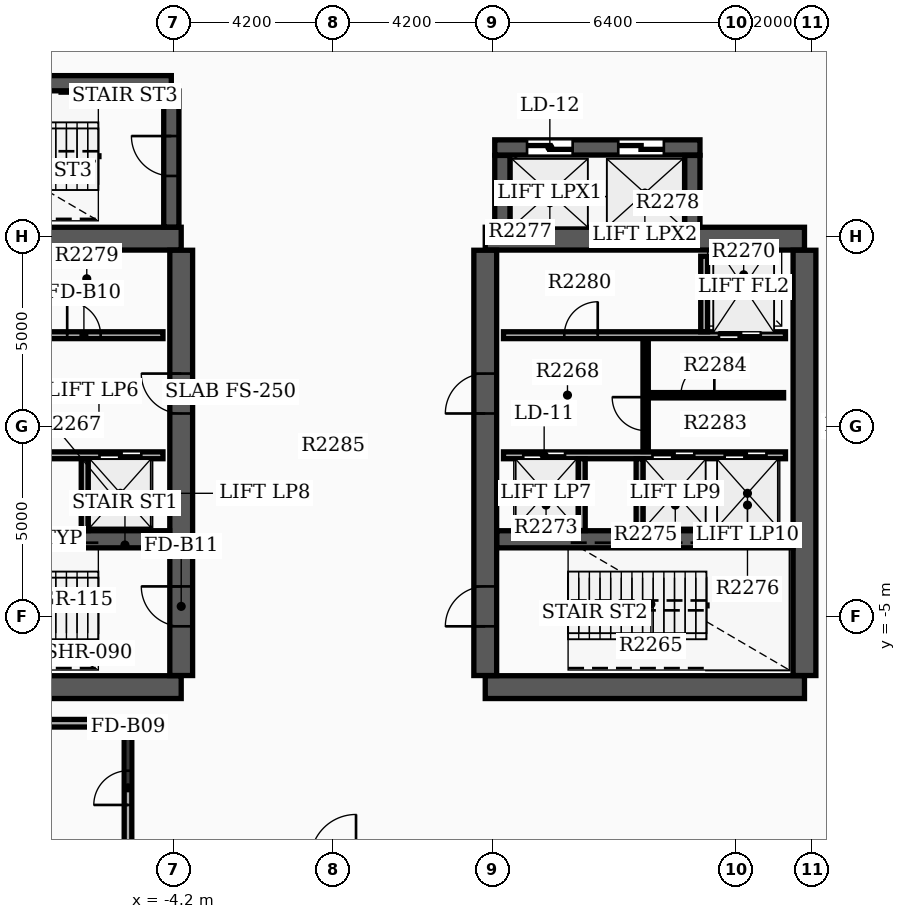
"""IFC4 building model, lengths in metres.
Left out: names, types, materials, properties, quantities, classifications, styles, units other than length and angle.
Written with IfcOpenShell. Run it as: python <this file> out.ifc"""

import sys

from ifc_helpers import new_model, si_unit, direction, frame, frame_2d, origin, place, context, subcontext, project, spatial, rectangle, extrude, element, fill, save


model = new_model("IFC4")
c1 = context("Model", 3, precision=1e-05, world=origin(), true_north=direction((0.0, 1.0)))
c2 = subcontext(c1, "Body", "Model", "MODEL_VIEW")
j1 = project(units=[si_unit("LENGTHUNIT", "METRE"), si_unit("PLANEANGLEUNIT", "RADIAN")], contexts=[c1])
p1 = place(None, origin())
s1 = spatial("IfcSite", under=j1, at=p1, CompositionType="ELEMENT")
p2 = place(p1, origin())
s2 = spatial("IfcBuilding", under=s1, at=p2, CompositionType="ELEMENT")
p3 = place(p2, frame((0.0, 0.0, 143.7)))
s3 = spatial("IfcBuildingStorey", under=s2, at=p3, CompositionType="ELEMENT", Elevation=143.7)
for number, where, z_axis, x_axis in (
    (1, (-12.4, -6.85, 0.0), (0.0, 0.0, 1.0), (1.0, 0.0, 0.0)),
    (2, (-12.4, 4.95, 0.0), (0.0, 0.0, 1.0), (1.0, 0.0, 0.0)),
):
    element("IfcWall", number, at=place(p3, frame(where, z_axis=z_axis, x_axis=x_axis)), inside=s3, PredefinedType="SHEAR", context=c2, shape_type="SweptSolid", body=[
        extrude(rectangle(XDim=8.4, YDim=0.6, at=frame_2d((4.2, 0.0))), origin(), (0.0, 0.0, 1.0), 4.9),
    ])
p4 = place(p3, frame((-4.0, -6.545, 0.0), z_axis=(0.0, 0.0, 1.0), x_axis=(0.0, 1.0, 0.0)))
e3 = element("IfcWall", 3, at=p4, inside=s3, PredefinedType="SHEAR", context=c2, shape_type="SweptSolid", body=[
    extrude(rectangle(XDim=11.19, YDim=0.6, at=frame_2d((5.595, 0.0))), origin(), (0.0, 0.0, 1.0), 4.9),
])
p5 = place(p4, frame((1.295, 0.0, 0.0)))
e4 = element("IfcOpeningElement", 4, at=p5, cuts=e3, PredefinedType="OPENING", context=c2, shape_type="SweptSolid", body=[
    extrude(rectangle(XDim=1.05, YDim=2.15, at=frame_2d((0.525, 1.075))), frame((0.0, 0.31, 0.0), z_axis=(0.0, -1.0, 0.0), x_axis=(1.0, 0.0, 0.0)), (0.0, 0.0, 1.0), 0.62),
])
p6 = place(p4, frame((6.895, 0.0, 0.0)))
e5 = element("IfcOpeningElement", 5, at=p6, cuts=e3, PredefinedType="OPENING", context=c2, shape_type="SweptSolid", body=[
    extrude(rectangle(XDim=1.05, YDim=2.15, at=frame_2d((0.525, 1.075))), frame((0.0, 0.31, 0.0), z_axis=(0.0, -1.0, 0.0), x_axis=(1.0, 0.0, 0.0)), (0.0, 0.0, 1.0), 0.62),
])
p7 = place(p3, frame((-12.095, -2.96, 0.0), z_axis=(0.0, 0.0, 1.0), x_axis=(1.0, 0.0, 0.0)))
e6 = element("IfcWall", 6, at=p7, inside=s3, PredefinedType="SHEAR", context=c2, shape_type="SweptSolid", body=[
    extrude(rectangle(XDim=7.79, YDim=0.45, at=frame_2d((3.895, 0.0))), origin(), (0.0, 0.0, 1.0), 4.9),
])
for number, where, z_axis, x_axis in (
    (7, (4.0, -6.85, 0.0), (0.0, 0.0, 1.0), (1.0, 0.0, 0.0)),
    (8, (4.0, 4.95, 0.0), (0.0, 0.0, 1.0), (1.0, 0.0, 0.0)),
):
    element("IfcWall", number, at=place(p3, frame(where, z_axis=z_axis, x_axis=x_axis)), inside=s3, PredefinedType="SHEAR", context=c2, shape_type="SweptSolid", body=[
        extrude(rectangle(XDim=8.4, YDim=0.6, at=frame_2d((4.2, 0.0))), origin(), (0.0, 0.0, 1.0), 4.9),
    ])
p8 = place(p3, frame((4.0, -6.545, 0.0), z_axis=(0.0, 0.0, 1.0), x_axis=(0.0, 1.0, 0.0)))
e9 = element("IfcWall", 9, at=p8, inside=s3, PredefinedType="SHEAR", context=c2, shape_type="SweptSolid", body=[
    extrude(rectangle(XDim=11.19, YDim=0.6, at=frame_2d((5.595, 0.0))), origin(), (0.0, 0.0, 1.0), 4.9),
])
p9 = place(p8, frame((1.295, 0.0, 0.0)))
e10 = element("IfcOpeningElement", 10, at=p9, cuts=e9, PredefinedType="OPENING", context=c2, shape_type="SweptSolid", body=[
    extrude(rectangle(XDim=1.05, YDim=2.15, at=frame_2d((0.525, 1.075))), frame((0.0, 0.31, 0.0), z_axis=(0.0, -1.0, 0.0), x_axis=(1.0, 0.0, 0.0)), (0.0, 0.0, 1.0), 0.62),
])
p10 = place(p8, frame((6.895, 0.0, 0.0)))
e11 = element("IfcOpeningElement", 11, at=p10, cuts=e9, PredefinedType="OPENING", context=c2, shape_type="SweptSolid", body=[
    extrude(rectangle(XDim=1.05, YDim=2.15, at=frame_2d((0.525, 1.075))), frame((0.0, 0.31, 0.0), z_axis=(0.0, -1.0, 0.0), x_axis=(1.0, 0.0, 0.0)), (0.0, 0.0, 1.0), 0.62),
])
p11 = place(p3, frame((12.4, -6.545, 0.0), z_axis=(0.0, 0.0, 1.0), x_axis=(0.0, 1.0, 0.0)))
e12 = element("IfcWall", 12, at=p11, inside=s3, PredefinedType="SHEAR", context=c2, shape_type="SweptSolid", body=[
    extrude(rectangle(XDim=11.19, YDim=0.6, at=frame_2d((5.595, 0.0))), origin(), (0.0, 0.0, 1.0), 4.9),
])
p12 = place(p3, frame((4.305, -2.96, 0.0), z_axis=(0.0, 0.0, 1.0), x_axis=(1.0, 0.0, 0.0)))
e13 = element("IfcWall", 13, at=p12, inside=s3, PredefinedType="SHEAR", context=c2, shape_type="SweptSolid", body=[
    extrude(rectangle(XDim=7.79, YDim=0.45, at=frame_2d((3.895, 0.0))), origin(), (0.0, 0.0, 1.0), 4.9),
])
p13 = place(p3, frame((-12.22, 9.04, 0.0), z_axis=(0.0, 0.0, 1.0), x_axis=(1.0, 0.0, 0.0)))
e14 = element("IfcWall", 14, at=p13, inside=s3, PredefinedType="SHEAR", context=c2, shape_type="SweptSolid", body=[
    extrude(rectangle(XDim=7.96, YDim=0.4, at=frame_2d((3.98, 0.0))), origin(), (0.0, 0.0, 1.0), 4.9),
])
p14 = place(p3, frame((-4.26, 5.255, 0.0), z_axis=(0.0, 0.0, 1.0), x_axis=(0.0, 1.0, 0.0)))
e15 = element("IfcWall", 15, at=p14, inside=s3, PredefinedType="SHEAR", context=c2, shape_type="SweptSolid", body=[
    extrude(rectangle(XDim=3.58, YDim=0.4, at=frame_2d((1.79, 0.0))), origin(), (0.0, 0.0, 1.0), 4.9),
])
p15 = place(p14, frame((1.345, 0.0, 0.0)))
e16 = element("IfcOpeningElement", 16, at=p15, cuts=e15, PredefinedType="OPENING", context=c2, shape_type="SweptSolid", body=[
    extrude(rectangle(XDim=1.05, YDim=2.15, at=frame_2d((0.525, 1.075))), frame((0.0, 0.21, 0.0), z_axis=(0.0, -1.0, 0.0), x_axis=(1.0, 0.0, 0.0)), (0.0, 0.0, 1.0), 0.42),
])
p16 = place(p3, frame((4.45, 5.255, 0.0), z_axis=(0.0, 0.0, 1.0), x_axis=(0.0, 1.0, 0.0)))
e17 = element("IfcWall", 17, at=p16, inside=s3, PredefinedType="SHEAR", context=c2, shape_type="SweptSolid", body=[
    extrude(rectangle(XDim=1.885, YDim=0.4, at=frame_2d((0.942, 0.0))), origin(), (0.0, 0.0, 1.0), 4.9),
])
p17 = place(p3, frame((4.25, 7.35, 0.0), z_axis=(0.0, 0.0, 1.0), x_axis=(1.0, 0.0, 0.0)))
e18 = element("IfcWall", 18, at=p17, inside=s3, PredefinedType="SHEAR", context=c2, shape_type="SweptSolid", body=[
    extrude(rectangle(XDim=5.4, YDim=0.4, at=frame_2d((2.7, 0.0))), origin(), (0.0, 0.0, 1.0), 4.9),
])
p18 = place(p17, frame((0.85, 0.0, 0.0)))
e19 = element("IfcOpeningElement", 19, at=p18, cuts=e18, PredefinedType="OPENING", context=c2, shape_type="SweptSolid", body=[
    extrude(rectangle(XDim=1.2, YDim=2.2, at=frame_2d((0.6, 1.1))), frame((0.0, 0.21, 0.0), z_axis=(0.0, -1.0, 0.0), x_axis=(1.0, 0.0, 0.0)), (0.0, 0.0, 1.0), 0.42),
])
p19 = place(p17, frame((3.25, 0.0, 0.0)))
e20 = element("IfcOpeningElement", 20, at=p19, cuts=e18, PredefinedType="OPENING", context=c2, shape_type="SweptSolid", body=[
    extrude(rectangle(XDim=1.2, YDim=2.2, at=frame_2d((0.6, 1.1))), frame((0.0, 0.21, 0.0), z_axis=(0.0, -1.0, 0.0), x_axis=(1.0, 0.0, 0.0)), (0.0, 0.0, 1.0), 0.42),
])
p20 = place(p3, frame((9.45, 5.255, 0.0), z_axis=(0.0, 0.0, 1.0), x_axis=(0.0, 1.0, 0.0)))
e21 = element("IfcWall", 21, at=p20, inside=s3, PredefinedType="SHEAR", context=c2, shape_type="SweptSolid", body=[
    extrude(rectangle(XDim=1.885, YDim=0.4, at=frame_2d((0.942, 0.0))), origin(), (0.0, 0.0, 1.0), 4.9),
])
p21 = place(p3, frame((-11.9, 2.41, 0.0), z_axis=(0.0, 0.0, 1.0), x_axis=(1.0, 0.0, 0.0)))
e22 = element("IfcWall", 22, at=p21, inside=s3, PredefinedType="SOLIDWALL", context=c2, shape_type="SweptSolid", body=[
    extrude(rectangle(XDim=7.42, YDim=0.18, at=frame_2d((3.71, 0.0))), origin(), (0.0, 0.0, 1.0), 3.97),
])
p22 = place(p21, frame((0.55, 0.0, 0.0)))
e23 = element("IfcOpeningElement", 23, at=p22, cuts=e22, PredefinedType="OPENING", context=c2, shape_type="SweptSolid", body=[
    extrude(rectangle(XDim=1.1, YDim=2.15, at=frame_2d((0.55, 1.075))), frame((0.0, 0.1, 0.0), z_axis=(0.0, -1.0, 0.0), x_axis=(1.0, 0.0, 0.0)), (0.0, 0.0, 1.0), 0.2),
])
p23 = place(p21, frame((4.9, 0.0, 0.0)))
e24 = element("IfcOpeningElement", 24, at=p23, cuts=e22, PredefinedType="OPENING", context=c2, shape_type="SweptSolid", body=[
    extrude(rectangle(XDim=0.88, YDim=2.1, at=frame_2d((0.44, 1.05))), frame((0.0, 0.1, 0.0), z_axis=(0.0, -1.0, 0.0), x_axis=(1.0, 0.0, 0.0)), (0.0, 0.0, 1.0), 0.2),
])
p24 = place(p3, frame((4.48, 2.41, 0.0), z_axis=(0.0, 0.0, 1.0), x_axis=(1.0, 0.0, 0.0)))
e25 = element("IfcWall", 25, at=p24, inside=s3, PredefinedType="SOLIDWALL", context=c2, shape_type="SweptSolid", body=[
    extrude(rectangle(XDim=7.42, YDim=0.18, at=frame_2d((3.71, 0.0))), origin(), (0.0, 0.0, 1.0), 3.97),
])
p25 = place(p24, frame((5.67, 0.0, 0.0)))
e26 = element("IfcOpeningElement", 26, at=p25, cuts=e25, PredefinedType="OPENING", context=c2, shape_type="SweptSolid", body=[
    extrude(rectangle(XDim=1.1, YDim=2.15, at=frame_2d((0.55, 1.075))), frame((0.0, 0.1, 0.0), z_axis=(0.0, -1.0, 0.0), x_axis=(1.0, 0.0, 0.0)), (0.0, 0.0, 1.0), 0.2),
])
p26 = place(p24, frame((1.6, 0.0, 0.0)))
e27 = element("IfcOpeningElement", 27, at=p26, cuts=e25, PredefinedType="OPENING", context=c2, shape_type="SweptSolid", body=[
    extrude(rectangle(XDim=0.88, YDim=2.1, at=frame_2d((0.44, 1.05))), frame((0.0, 0.1, 0.0), z_axis=(0.0, -1.0, 0.0), x_axis=(1.0, 0.0, 0.0)), (0.0, 0.0, 1.0), 0.2),
])
p27 = place(p3, frame((-11.9, -0.75, 0.0), z_axis=(0.0, 0.0, 1.0), x_axis=(1.0, 0.0, 0.0)))
e28 = element("IfcWall", 28, at=p27, inside=s3, PredefinedType="SOLIDWALL", context=c2, shape_type="SweptSolid", body=[
    extrude(rectangle(XDim=7.42, YDim=0.18, at=frame_2d((3.71, 0.0))), origin(), (0.0, 0.0, 1.0), 3.97),
])
p28 = place(p27, frame((0.45, 0.0, 0.0)))
e29 = element("IfcOpeningElement", 29, at=p28, cuts=e28, PredefinedType="OPENING", context=c2, shape_type="SweptSolid", body=[
    extrude(rectangle(XDim=1.1, YDim=2.15, at=frame_2d((0.55, 1.075))), frame((0.0, 0.1, 0.0), z_axis=(0.0, -1.0, 0.0), x_axis=(1.0, 0.0, 0.0)), (0.0, 0.0, 1.0), 0.2),
])
p29 = place(p27, frame((2.35, 0.0, 0.0)))
e30 = element("IfcOpeningElement", 30, at=p29, cuts=e28, PredefinedType="OPENING", context=c2, shape_type="SweptSolid", body=[
    extrude(rectangle(XDim=1.1, YDim=2.15, at=frame_2d((0.55, 1.075))), frame((0.0, 0.1, 0.0), z_axis=(0.0, -1.0, 0.0), x_axis=(1.0, 0.0, 0.0)), (0.0, 0.0, 1.0), 0.2),
])
p30 = place(p27, frame((5.75, 0.0, 0.0)))
e31 = element("IfcOpeningElement", 31, at=p30, cuts=e28, PredefinedType="OPENING", context=c2, shape_type="SweptSolid", body=[
    extrude(rectangle(XDim=1.1, YDim=2.15, at=frame_2d((0.55, 1.075))), frame((0.0, 0.1, 0.0), z_axis=(0.0, -1.0, 0.0), x_axis=(1.0, 0.0, 0.0)), (0.0, 0.0, 1.0), 0.2),
])
p31 = place(p3, frame((4.48, -0.75, 0.0), z_axis=(0.0, 0.0, 1.0), x_axis=(1.0, 0.0, 0.0)))
e32 = element("IfcWall", 32, at=p31, inside=s3, PredefinedType="SOLIDWALL", context=c2, shape_type="SweptSolid", body=[
    extrude(rectangle(XDim=7.42, YDim=0.18, at=frame_2d((3.71, 0.0))), origin(), (0.0, 0.0, 1.0), 3.97),
])
p32 = place(p31, frame((0.52, 0.0, 0.0)))
e33 = element("IfcOpeningElement", 33, at=p32, cuts=e32, PredefinedType="OPENING", context=c2, shape_type="SweptSolid", body=[
    extrude(rectangle(XDim=1.1, YDim=2.15, at=frame_2d((0.55, 1.075))), frame((0.0, 0.1, 0.0), z_axis=(0.0, -1.0, 0.0), x_axis=(1.0, 0.0, 0.0)), (0.0, 0.0, 1.0), 0.2),
])
p33 = place(p31, frame((3.92, 0.0, 0.0)))
e34 = element("IfcOpeningElement", 34, at=p33, cuts=e32, PredefinedType="OPENING", context=c2, shape_type="SweptSolid", body=[
    extrude(rectangle(XDim=1.1, YDim=2.15, at=frame_2d((0.55, 1.075))), frame((0.0, 0.1, 0.0), z_axis=(0.0, -1.0, 0.0), x_axis=(1.0, 0.0, 0.0)), (0.0, 0.0, 1.0), 0.2),
])
p34 = place(p31, frame((5.82, 0.0, 0.0)))
e35 = element("IfcOpeningElement", 35, at=p34, cuts=e32, PredefinedType="OPENING", context=c2, shape_type="SweptSolid", body=[
    extrude(rectangle(XDim=1.1, YDim=2.15, at=frame_2d((0.55, 1.075))), frame((0.0, 0.1, 0.0), z_axis=(0.0, -1.0, 0.0), x_axis=(1.0, 0.0, 0.0)), (0.0, 0.0, 1.0), 0.2),
])
p35 = place(p3, frame((9.76, 2.5, 0.0), z_axis=(0.0, 0.0, 1.0), x_axis=(0.0, 1.0, 0.0)))
e36 = element("IfcWall", 36, at=p35, inside=s3, PredefinedType="SOLIDWALL", context=c2, shape_type="SweptSolid", body=[
    extrude(rectangle(XDim=1.99, YDim=0.18, at=frame_2d((0.995, 0.0))), origin(), (0.0, 0.0, 1.0), 3.97),
])
for number, where, z_axis, x_axis in (
    (37, (-6.54, -2.73, 0.0), (0.0, 0.0, 1.0), (0.0, 1.0, 0.0)),
    (38, (6.54, -2.73, 0.0), (0.0, 0.0, 1.0), (0.0, 1.0, 0.0)),
    (39, (8.06, -2.73, 0.0), (0.0, 0.0, 1.0), (0.0, 1.0, 0.0)),
):
    element("IfcWall", number, at=place(p3, frame(where, z_axis=z_axis, x_axis=x_axis)), inside=s3, PredefinedType="SOLIDWALL", context=c2, shape_type="SweptSolid", body=[
        extrude(rectangle(XDim=1.89, YDim=0.18, at=frame_2d((0.945, 0.0))), origin(), (0.0, 0.0, 1.0), 3.97),
    ])
p36 = place(p3, frame((8.22, -0.65, 0.0), z_axis=(0.0, 0.0, 1.0), x_axis=(0.0, 1.0, 0.0)))
e40 = element("IfcWall", 40, at=p36, inside=s3, PredefinedType="SOLIDWALL", context=c2, shape_type="SweptSolid", body=[
    extrude(rectangle(XDim=2.96, YDim=0.14, at=frame_2d((1.48, 0.0))), origin(), (0.0, 0.0, 1.0), 3.97),
])
p37 = place(p36, frame((0.55, 0.0, 0.0)))
e41 = element("IfcOpeningElement", 41, at=p37, cuts=e40, PredefinedType="OPENING", context=c2, shape_type="SweptSolid", body=[
    extrude(rectangle(XDim=0.88, YDim=2.1, at=frame_2d((0.44, 1.05))), frame((0.0, 0.08, 0.0), z_axis=(0.0, -1.0, 0.0), x_axis=(1.0, 0.0, 0.0)), (0.0, 0.0, 1.0), 0.16),
])
p38 = place(p3, frame((8.298, 0.83, 0.0), z_axis=(0.0, 0.0, 1.0), x_axis=(1.0, 0.0, 0.0)))
e42 = element("IfcWall", 42, at=p38, inside=s3, PredefinedType="PARTITIONING", context=c2, shape_type="SweptSolid", body=[
    extrude(rectangle(XDim=3.552, YDim=0.14, at=frame_2d((1.776, 0.0))), origin(), (0.0, 0.0, 1.0), 3.97),
])
p39 = place(p38, frame((0.85, 0.0, 0.0)))
e43 = element("IfcOpeningElement", 43, at=p39, cuts=e42, PredefinedType="OPENING", context=c2, shape_type="SweptSolid", body=[
    extrude(rectangle(XDim=0.88, YDim=2.1, at=frame_2d((0.44, 1.05))), frame((0.0, 0.08, 0.0), z_axis=(0.0, -1.0, 0.0), x_axis=(1.0, 0.0, 0.0)), (0.0, 0.0, 1.0), 0.16),
])
p40 = place(p3, frame((-11.4, -7.8, 0.0), z_axis=(0.0, 0.0, 1.0), x_axis=(1.0, 0.0, 0.0)))
e44 = element("IfcWall", 44, at=p40, inside=s3, PredefinedType="PARTITIONING", context=c2, shape_type="SweptSolid", body=[
    extrude(rectangle(XDim=6.0, YDim=0.2, at=frame_2d((3.0, 0.0))), origin(), (0.0, 0.0, 1.0), 3.97),
])
p41 = place(p3, frame((-5.4, -11.095, 0.0), z_axis=(0.0, 0.0, 1.0), x_axis=(0.0, 1.0, 0.0)))
e45 = element("IfcWall", 45, at=p41, inside=s3, PredefinedType="PARTITIONING", context=c2, shape_type="SweptSolid", body=[
    extrude(rectangle(XDim=3.19, YDim=0.2, at=frame_2d((1.595, 0.0))), origin(), (0.0, 0.0, 1.0), 3.97),
])
p42 = place(p41, frame((1.145, 0.0, 0.0)))
e46 = element("IfcOpeningElement", 46, at=p42, cuts=e45, PredefinedType="OPENING", context=c2, shape_type="SweptSolid", body=[
    extrude(rectangle(XDim=0.9, YDim=2.15, at=frame_2d((0.45, 1.075))), frame((0.0, 0.11, 0.0), z_axis=(0.0, -1.0, 0.0), x_axis=(1.0, 0.0, 0.0)), (0.0, 0.0, 1.0), 0.22),
])
p43 = place(p5, origin())
e47 = element("IfcDoor", 47, at=p43, inside=s3, OperationType="SINGLE_SWING_RIGHT", PredefinedType="DOOR", context=c2, shape_type="SweptSolid", body=[
    extrude(rectangle(XDim=1.05, YDim=2.15, at=frame_2d((0.525, 1.075))), frame((0.0, 0.025, 0.0), z_axis=(0.0, -1.0, 0.0), x_axis=(1.0, 0.0, 0.0)), (0.0, 0.0, 1.0), 0.05),
])
fill(e4, e47)
p44 = place(p9, origin())
e48 = element("IfcDoor", 48, at=p44, inside=s3, OperationType="SINGLE_SWING_LEFT", PredefinedType="DOOR", context=c2, shape_type="SweptSolid", body=[
    extrude(rectangle(XDim=1.05, YDim=2.15, at=frame_2d((0.525, 1.075))), frame((0.0, 0.025, 0.0), z_axis=(0.0, -1.0, 0.0), x_axis=(1.0, 0.0, 0.0)), (0.0, 0.0, 1.0), 0.05),
])
fill(e10, e48)
p45 = place(p6, origin())
e49 = element("IfcDoor", 49, at=p45, inside=s3, OperationType="SINGLE_SWING_RIGHT", PredefinedType="DOOR", context=c2, shape_type="SweptSolid", body=[
    extrude(rectangle(XDim=1.05, YDim=2.15, at=frame_2d((0.525, 1.075))), frame((0.0, 0.025, 0.0), z_axis=(0.0, -1.0, 0.0), x_axis=(1.0, 0.0, 0.0)), (0.0, 0.0, 1.0), 0.05),
])
fill(e5, e49)
p46 = place(p10, origin())
e50 = element("IfcDoor", 50, at=p46, inside=s3, OperationType="SINGLE_SWING_LEFT", PredefinedType="DOOR", context=c2, shape_type="SweptSolid", body=[
    extrude(rectangle(XDim=1.05, YDim=2.15, at=frame_2d((0.525, 1.075))), frame((0.0, 0.025, 0.0), z_axis=(0.0, -1.0, 0.0), x_axis=(1.0, 0.0, 0.0)), (0.0, 0.0, 1.0), 0.05),
])
fill(e11, e50)
p47 = place(p15, origin())
e51 = element("IfcDoor", 51, at=p47, inside=s3, OperationType="SINGLE_SWING_RIGHT", PredefinedType="DOOR", context=c2, shape_type="SweptSolid", body=[
    extrude(rectangle(XDim=1.05, YDim=2.15, at=frame_2d((0.525, 1.075))), frame((0.0, 0.025, 0.0), z_axis=(0.0, -1.0, 0.0), x_axis=(1.0, 0.0, 0.0)), (0.0, 0.0, 1.0), 0.05),
])
fill(e16, e51)
p48 = place(p25, origin())
e52 = element("IfcDoor", 52, at=p48, inside=s3, OperationType="DOUBLE_DOOR_SLIDING", PredefinedType="DOOR", context=c2, shape_type="SweptSolid", body=[
    extrude(rectangle(XDim=1.1, YDim=2.15, at=frame_2d((0.55, 1.075))), frame((0.0, 0.025, 0.0), z_axis=(0.0, -1.0, 0.0), x_axis=(1.0, 0.0, 0.0)), (0.0, 0.0, 1.0), 0.05),
])
fill(e26, e52)
p49 = place(p32, origin())
e53 = element("IfcDoor", 53, at=p49, inside=s3, OperationType="DOUBLE_DOOR_SLIDING", PredefinedType="DOOR", context=c2, shape_type="SweptSolid", body=[
    extrude(rectangle(XDim=1.1, YDim=2.15, at=frame_2d((0.55, 1.075))), frame((0.0, 0.025, 0.0), z_axis=(0.0, -1.0, 0.0), x_axis=(1.0, 0.0, 0.0)), (0.0, 0.0, 1.0), 0.05),
])
fill(e33, e53)
p50 = place(p30, origin())
e54 = element("IfcDoor", 54, at=p50, inside=s3, OperationType="DOUBLE_DOOR_SLIDING", PredefinedType="DOOR", context=c2, shape_type="SweptSolid", body=[
    extrude(rectangle(XDim=1.1, YDim=2.15, at=frame_2d((0.55, 1.075))), frame((0.0, 0.025, 0.0), z_axis=(0.0, -1.0, 0.0), x_axis=(1.0, 0.0, 0.0)), (0.0, 0.0, 1.0), 0.05),
])
fill(e31, e54)
p51 = place(p33, origin())
e55 = element("IfcDoor", 55, at=p51, inside=s3, OperationType="DOUBLE_DOOR_SLIDING", PredefinedType="DOOR", context=c2, shape_type="SweptSolid", body=[
    extrude(rectangle(XDim=1.1, YDim=2.15, at=frame_2d((0.55, 1.075))), frame((0.0, 0.025, 0.0), z_axis=(0.0, -1.0, 0.0), x_axis=(1.0, 0.0, 0.0)), (0.0, 0.0, 1.0), 0.05),
])
fill(e34, e55)
p52 = place(p34, origin())
e56 = element("IfcDoor", 56, at=p52, inside=s3, OperationType="DOUBLE_DOOR_SLIDING", PredefinedType="DOOR", context=c2, shape_type="SweptSolid", body=[
    extrude(rectangle(XDim=1.1, YDim=2.15, at=frame_2d((0.55, 1.075))), frame((0.0, 0.025, 0.0), z_axis=(0.0, -1.0, 0.0), x_axis=(1.0, 0.0, 0.0)), (0.0, 0.0, 1.0), 0.05),
])
fill(e35, e56)
p53 = place(p18, origin())
e57 = element("IfcDoor", 57, at=p53, inside=s3, OperationType="DOUBLE_DOOR_SLIDING", PredefinedType="DOOR", context=c2, shape_type="SweptSolid", body=[
    extrude(rectangle(XDim=1.2, YDim=2.2, at=frame_2d((0.6, 1.1))), frame((0.0, 0.025, 0.0), z_axis=(0.0, -1.0, 0.0), x_axis=(1.0, 0.0, 0.0)), (0.0, 0.0, 1.0), 0.05),
])
fill(e19, e57)
p54 = place(p19, origin())
e58 = element("IfcDoor", 58, at=p54, inside=s3, OperationType="DOUBLE_DOOR_SLIDING", PredefinedType="DOOR", context=c2, shape_type="SweptSolid", body=[
    extrude(rectangle(XDim=1.2, YDim=2.2, at=frame_2d((0.6, 1.1))), frame((0.0, 0.025, 0.0), z_axis=(0.0, -1.0, 0.0), x_axis=(1.0, 0.0, 0.0)), (0.0, 0.0, 1.0), 0.05),
])
fill(e20, e58)
p55 = place(p23, origin())
e59 = element("IfcDoor", 59, at=p55, inside=s3, OperationType="SINGLE_SWING_LEFT", PredefinedType="DOOR", context=c2, shape_type="SweptSolid", body=[
    extrude(rectangle(XDim=0.88, YDim=2.1, at=frame_2d((0.44, 1.05))), frame((0.0, 0.025, 0.0), z_axis=(0.0, -1.0, 0.0), x_axis=(1.0, 0.0, 0.0)), (0.0, 0.0, 1.0), 0.05),
])
fill(e24, e59)
p56 = place(p26, origin())
e60 = element("IfcDoor", 60, at=p56, inside=s3, OperationType="SINGLE_SWING_RIGHT", PredefinedType="DOOR", context=c2, shape_type="SweptSolid", body=[
    extrude(rectangle(XDim=0.88, YDim=2.1, at=frame_2d((0.44, 1.05))), frame((0.0, 0.025, 0.0), z_axis=(0.0, -1.0, 0.0), x_axis=(1.0, 0.0, 0.0)), (0.0, 0.0, 1.0), 0.05),
])
fill(e27, e60)
p57 = place(p37, origin())
e61 = element("IfcDoor", 61, at=p57, inside=s3, OperationType="SINGLE_SWING_RIGHT", PredefinedType="DOOR", context=c2, shape_type="SweptSolid", body=[
    extrude(rectangle(XDim=0.88, YDim=2.1, at=frame_2d((0.44, 1.05))), frame((0.0, 0.025, 0.0), z_axis=(0.0, -1.0, 0.0), x_axis=(1.0, 0.0, 0.0)), (0.0, 0.0, 1.0), 0.05),
])
fill(e41, e61)
p58 = place(p39, origin())
e62 = element("IfcDoor", 62, at=p58, inside=s3, OperationType="SINGLE_SWING_RIGHT", PredefinedType="DOOR", context=c2, shape_type="SweptSolid", body=[
    extrude(rectangle(XDim=0.88, YDim=2.1, at=frame_2d((0.44, 1.05))), frame((0.0, 0.025, 0.0), z_axis=(0.0, -1.0, 0.0), x_axis=(1.0, 0.0, 0.0)), (0.0, 0.0, 1.0), 0.05),
])
fill(e43, e62)
p59 = place(p42, origin())
e63 = element("IfcDoor", 63, at=p59, inside=s3, OperationType="SINGLE_SWING_LEFT", PredefinedType="DOOR", context=c2, shape_type="SweptSolid", body=[
    extrude(rectangle(XDim=0.9, YDim=2.15, at=frame_2d((0.45, 1.075))), frame((0.0, 0.025, 0.0), z_axis=(0.0, -1.0, 0.0), x_axis=(1.0, 0.0, 0.0)), (0.0, 0.0, 1.0), 0.05),
])
fill(e46, e63)
save(model, sys.argv[1])
